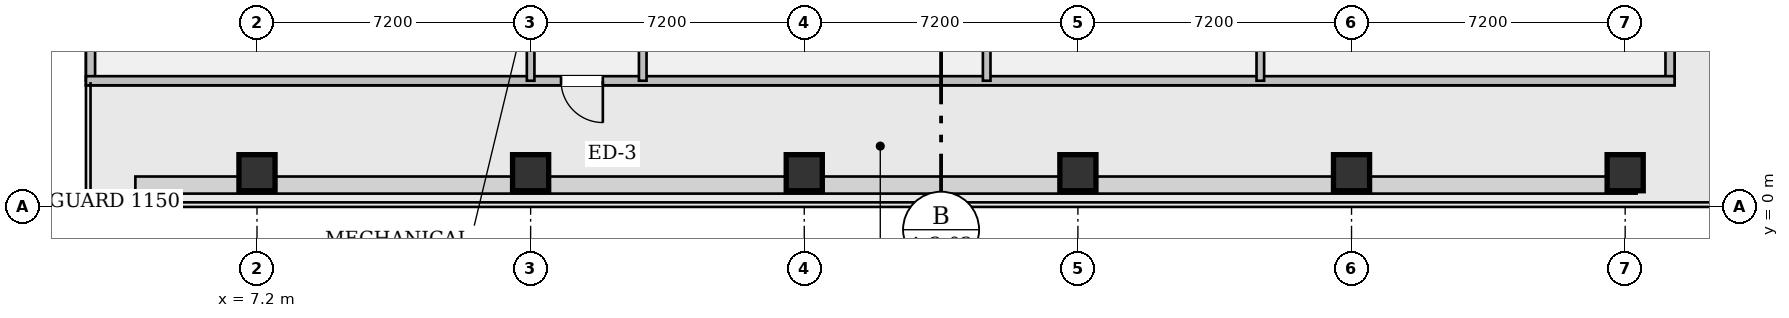
"""IFC4 building model, lengths in metres.
Left out: names, types, materials, properties, quantities, classifications, styles, units other than length and angle.
Written with IfcOpenShell. Run it as: python <this file> out.ifc"""

import sys

from ifc_helpers import new_model, si_unit, direction, frame, frame_2d, origin, origin_2d, place, context, subcontext, project, spatial, rectangle, hollow_rectangle, extrude, element, fill, save


model = new_model("IFC4")
c1 = context("Model", 3, precision=1e-05, world=origin(), true_north=direction((0.0, 1.0)))
c2 = subcontext(c1, "Body", "Model", "MODEL_VIEW")
j1 = project(units=[si_unit("LENGTHUNIT", "METRE"), si_unit("PLANEANGLEUNIT", "RADIAN")], contexts=[c1])
p1 = place(None, origin())
s1 = spatial("IfcSite", under=j1, at=p1, CompositionType="ELEMENT")
p2 = place(p1, origin())
s2 = spatial("IfcBuilding", under=s1, at=p2, CompositionType="ELEMENT")
p3 = place(p2, frame((0.0, 0.0, 92.75)))
s3 = spatial("IfcBuildingStorey", under=s2, at=p3, CompositionType="ELEMENT", Elevation=92.75)
for number, where, z_axis, x_axis in (
    (1, (7.2, 0.9, 0.0), (0.0, 0.0, 1.0), (1.0, 0.0, 0.0)),
    (2, (14.4, 0.9, 0.0), (0.0, 0.0, 1.0), (1.0, 0.0, 0.0)),
    (3, (21.6, 0.9, 0.0), (0.0, 0.0, 1.0), (1.0, 0.0, 0.0)),
    (4, (28.8, 0.9, 0.0), (0.0, 0.0, 1.0), (1.0, 0.0, 0.0)),
    (5, (36.0, 0.9, 0.0), (0.0, 0.0, 1.0), (1.0, 0.0, 0.0)),
    (6, (43.2, 0.9, 0.0), (0.0, 0.0, 1.0), (1.0, 0.0, 0.0)),
):
    element("IfcColumn", number, at=place(p3, frame(where, z_axis=z_axis, x_axis=x_axis)), inside=s3, PredefinedType="COLUMN", context=c2, shape_type="SweptSolid", body=[
        extrude(hollow_rectangle(XDim=0.95, YDim=0.95, WallThickness=0.06, at=origin_2d()), origin(), (0.0, 0.0, 1.0), 4.6),
    ])
for number, where, z_axis, x_axis in (
    (7, (2.82, 3.32, 0.0), (0.0, 0.0, 1.0), (0.0, 1.0, 0.0)),
    (8, (44.38, 6.02, 0.0), (0.0, 0.0, 1.0), (0.0, -1.0, 0.0)),
):
    element("IfcWall", number, at=place(p3, frame(where, z_axis=z_axis, x_axis=x_axis)), inside=s3, PredefinedType="STANDARD", context=c2, shape_type="SweptSolid", body=[
        extrude(rectangle(XDim=2.7, YDim=0.24, at=frame_2d((1.35, 0.0))), origin(), (0.0, 0.0, 1.0), 4.6),
    ])
p4 = place(p3, frame((44.5, 3.32, 0.0), z_axis=(0.0, 0.0, 1.0), x_axis=(-1.0, 0.0, 0.0)))
e9 = element("IfcWall", 9, at=p4, inside=s3, PredefinedType="STANDARD", context=c2, shape_type="SweptSolid", body=[
    extrude(rectangle(XDim=41.8, YDim=0.24, at=frame_2d((20.9, 0.0))), origin(), (0.0, 0.0, 1.0), 3.185),
])
p5 = place(p4, frame((28.2, 0.0, 0.0)))
e10 = element("IfcOpeningElement", 10, at=p5, cuts=e9, PredefinedType="OPENING", context=c2, shape_type="SweptSolid", body=[
    extrude(rectangle(XDim=1.1, YDim=2.15, at=frame_2d((0.55, 1.075))), frame((0.0, 0.132, 0.0), z_axis=(0.0, -1.0, 0.0), x_axis=(1.0, 0.0, 0.0)), (0.0, 0.0, 1.0), 0.264),
])
p6 = place(p3, frame((14.4, 3.32, 0.0), z_axis=(0.0, 0.0, 1.0), x_axis=(0.0, 1.0, 0.0)))
e11 = element("IfcWall", 11, at=p6, inside=s3, PredefinedType="PARTITIONING", context=c2, shape_type="SweptSolid", body=[
    extrude(rectangle(XDim=3.88, YDim=0.2, at=frame_2d((1.94, 0.0))), origin(), (0.0, 0.0, 1.0), 3.467),
])
p7 = place(p6, frame((2.15, 0.0, 0.0)))
e12 = element("IfcOpeningElement", 12, at=p7, cuts=e11, PredefinedType="OPENING", context=c2, shape_type="SweptSolid", body=[
    extrude(rectangle(XDim=1.0, YDim=2.15, at=frame_2d((0.5, 1.075))), frame((0.0, 0.112, 0.0), z_axis=(0.0, -1.0, 0.0), x_axis=(1.0, 0.0, 0.0)), (0.0, 0.0, 1.0), 0.224),
])
p8 = place(p3, frame((17.35, 3.32, 0.0), z_axis=(0.0, 0.0, 1.0), x_axis=(0.0, 1.0, 0.0)))
e13 = element("IfcWall", 13, at=p8, inside=s3, PredefinedType="PARTITIONING", context=c2, shape_type="SweptSolid", body=[
    extrude(rectangle(XDim=8.18, YDim=0.2, at=frame_2d((4.09, 0.0))), origin(), (0.0, 0.0, 1.0), 3.813),
])
p9 = place(p3, frame((33.6, 3.32, 0.0), z_axis=(0.0, 0.0, 1.0), x_axis=(0.0, 1.0, 0.0)))
e14 = element("IfcWall", 14, at=p9, inside=s3, PredefinedType="PARTITIONING", context=c2, shape_type="SweptSolid", body=[
    extrude(rectangle(XDim=21.76, YDim=0.2, at=frame_2d((10.88, 0.0))), origin(), (0.0, 0.0, 1.0), 3.813),
])
p10 = place(p9, frame((8.83, 0.0, 0.0)))
e15 = element("IfcOpeningElement", 15, at=p10, cuts=e14, PredefinedType="OPENING", context=c2, shape_type="SweptSolid", body=[
    extrude(rectangle(XDim=1.2, YDim=2.15, at=frame_2d((0.6, 1.075))), frame((0.0, 0.112, 0.0), z_axis=(0.0, -1.0, 0.0), x_axis=(1.0, 0.0, 0.0)), (0.0, 0.0, 1.0), 0.224),
])
p11 = place(p3, frame((26.4, 3.32, 0.0), z_axis=(0.0, 0.0, 1.0), x_axis=(0.0, 1.0, 0.0)))
e16 = element("IfcWall", 16, at=p11, inside=s3, PredefinedType="PARTITIONING", context=c2, shape_type="SweptSolid", body=[
    extrude(rectangle(XDim=8.18, YDim=0.2, at=frame_2d((4.09, 0.0))), origin(), (0.0, 0.0, 1.0), 3.813),
])
p12 = place(p5, origin())
e17 = element("IfcDoor", 17, at=p12, inside=s3, OperationType="SINGLE_SWING_LEFT", PredefinedType="DOOR", context=c2, shape_type="SweptSolid", body=[
    extrude(rectangle(XDim=1.1, YDim=2.15, at=frame_2d((0.55, 1.075))), frame((0.0, 0.025, 0.0), z_axis=(0.0, -1.0, 0.0), x_axis=(1.0, 0.0, 0.0)), (0.0, 0.0, 1.0), 0.05),
])
fill(e10, e17)
save(model, sys.argv[1])
